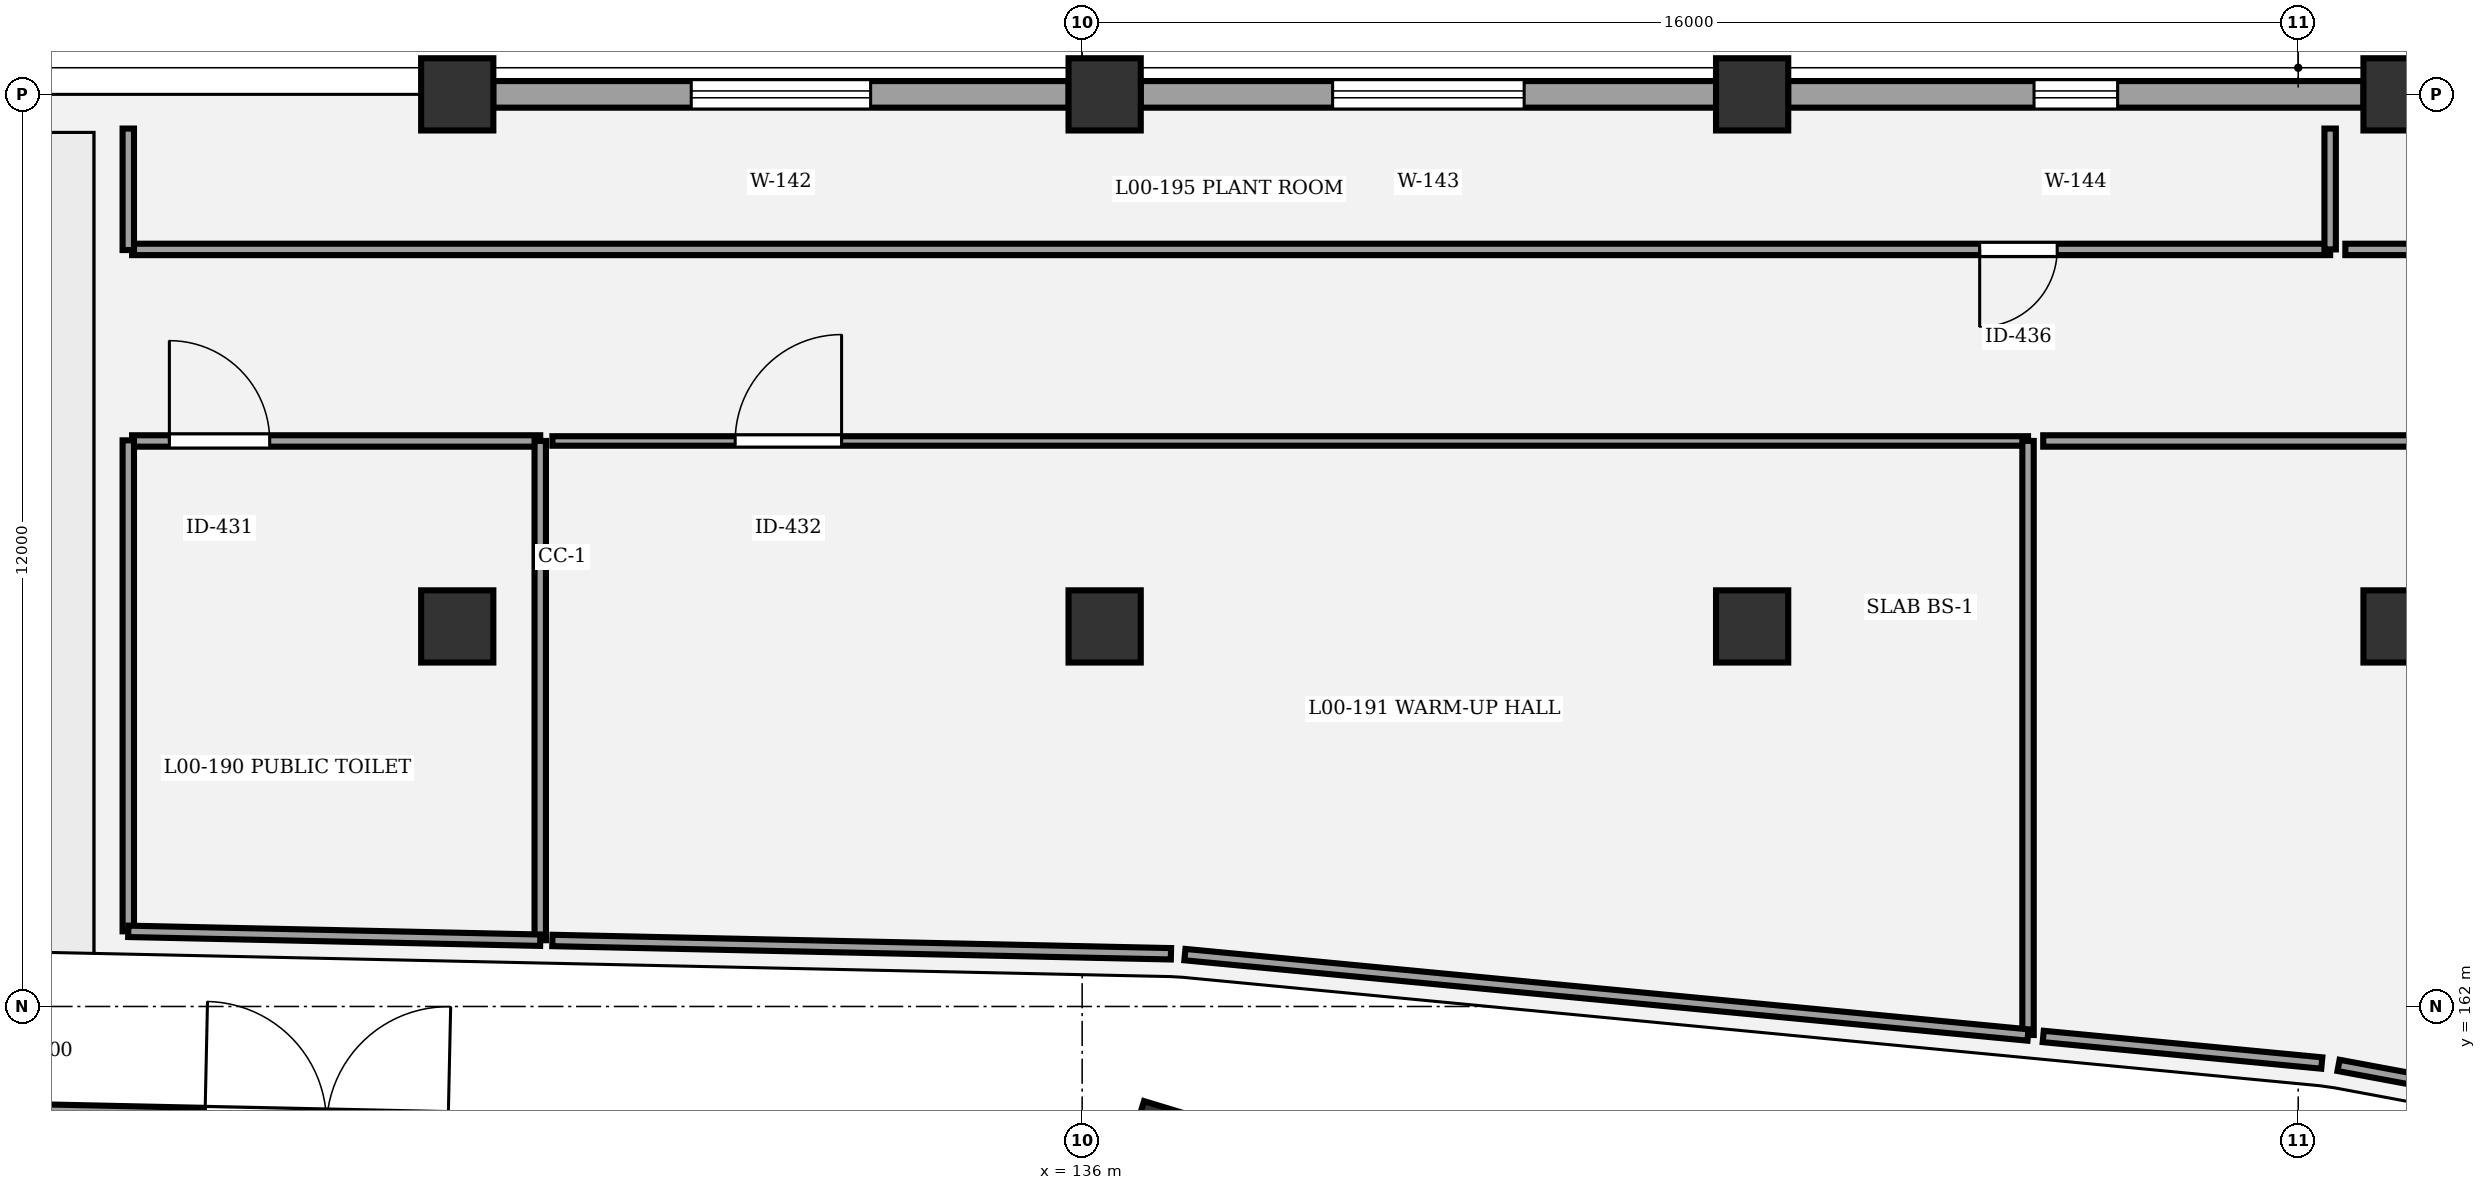
"""IFC4 building model, lengths in metres.
Left out: names, types, materials, properties, quantities, classifications, styles, units other than length and angle.
Written with IfcOpenShell. Run it as: python <this file> out.ifc"""

import sys

from ifc_helpers import new_model, si_unit, direction, frame, frame_2d, origin, origin_2d, place, context, subcontext, project, spatial, rectangle, circle, extrude, element, fill, save


model = new_model("IFC4")
c1 = context("Model", 3, precision=1e-05, world=origin(), true_north=direction((0.0, 1.0)))
c2 = subcontext(c1, "Body", "Model", "MODEL_VIEW")
j1 = project(units=[si_unit("LENGTHUNIT", "METRE"), si_unit("PLANEANGLEUNIT", "RADIAN")], contexts=[c1])
p1 = place(None, origin())
s1 = spatial("IfcSite", under=j1, at=p1, CompositionType="ELEMENT")
p2 = place(p1, origin())
s2 = spatial("IfcBuilding", under=s1, at=p2, CompositionType="ELEMENT")
p3 = place(p2, origin())
s3 = spatial("IfcBuildingStorey", under=s2, at=p3, CompositionType="ELEMENT", Elevation=0.0)
p4 = place(p3, frame((137.115, 160.194, 0.0), z_axis=(0.0, 0.0, 1.0), x_axis=(0.289198876314, 0.957269037387, 0.0)))
e1 = element("IfcColumn", 1, at=p4, inside=s3, PredefinedType="COLUMN", context=c2, shape_type="SweptSolid", body=[
    extrude(rectangle(XDim=0.9, YDim=0.9, at=origin_2d()), origin(), (0.0, 0.0, 1.0), 5.4),
])
for number, where, z_axis, x_axis in (
    (2, (127.778, 167.0, 0.0), (0.0, 0.0, 1.0), (1.0, 0.0, 0.0)),
    (3, (127.778, 174.0, 0.0), (0.0, 0.0, 1.0), (1.0, 0.0, 0.0)),
    (4, (136.296, 167.0, 0.0), (0.0, 0.0, 1.0), (1.0, 0.0, 0.0)),
    (5, (136.296, 174.0, 0.0), (0.0, 0.0, 1.0), (1.0, 0.0, 0.0)),
    (6, (144.815, 167.0, 0.0), (0.0, 0.0, 1.0), (1.0, 0.0, 0.0)),
    (7, (144.815, 174.0, 0.0), (0.0, 0.0, 1.0), (1.0, 0.0, 0.0)),
    (8, (153.333, 167.0, 0.0), (0.0, 0.0, 1.0), (1.0, 0.0, 0.0)),
    (9, (153.333, 174.0, 0.0), (0.0, 0.0, 1.0), (1.0, 0.0, 0.0)),
):
    element("IfcColumn", number, at=place(p3, frame(where, z_axis=z_axis, x_axis=x_axis)), inside=s3, PredefinedType="COLUMN", context=c2, shape_type="SweptSolid", body=[
        extrude(circle(Radius=0.475, at=origin_2d()), origin(), (0.0, 0.0, 1.0), 5.4),
    ])
p5 = place(p3, frame((115.448, 160.66, 0.0), z_axis=(0.0, 0.0, 1.0), x_axis=(0.999768115817, -0.021534033422, 0.0)))
e10 = element("IfcWall", 10, at=p5, inside=s3, PredefinedType="STANDARD", context=c2, shape_type="SweptSolid", body=[
    extrude(rectangle(XDim=21.224, YDim=0.4, at=frame_2d((10.612, 0.0))), origin(), (0.0, 0.0, 1.0), 4.25),
])
p6 = place(p5, frame((9.012, 0.0, 0.0)))
e11 = element("IfcOpeningElement", 11, at=p6, cuts=e10, PredefinedType="OPENING", context=c2, shape_type="SweptSolid", body=[
    extrude(rectangle(XDim=3.2, YDim=3.1, at=frame_2d((1.6, 1.55))), frame((0.0, 0.21, 0.0), z_axis=(0.0, -1.0, 0.0), x_axis=(1.0, 0.0, 0.0)), (0.0, 0.0, 1.0), 0.42),
])
p7 = place(p3, frame((128.251, 174.0, 0.0), z_axis=(0.0, 0.0, 1.0), x_axis=(1.0, 0.0, 0.0)))
e12 = element("IfcWall", 12, at=p7, inside=s3, PredefinedType="STANDARD", context=c2, shape_type="SweptSolid", body=[
    extrude(rectangle(XDim=7.572, YDim=0.35, at=frame_2d((3.786, 0.0))), origin(), (0.0, 0.0, 1.0), 4.16),
])
p8 = place(p7, frame((2.606, 0.0, 0.9)))
e13 = element("IfcOpeningElement", 13, at=p8, cuts=e12, PredefinedType="OPENING", context=c2, shape_type="SweptSolid", body=[
    extrude(rectangle(XDim=2.36, YDim=1.55, at=frame_2d((1.18, 0.775))), frame((0.0, 0.185, 0.0), z_axis=(0.0, -1.0, 0.0), x_axis=(1.0, 0.0, 0.0)), (0.0, 0.0, 1.0), 0.37),
])
p9 = place(p3, frame((136.769, 174.0, 0.0), z_axis=(0.0, 0.0, 1.0), x_axis=(1.0, 0.0, 0.0)))
e14 = element("IfcWall", 14, at=p9, inside=s3, PredefinedType="STANDARD", context=c2, shape_type="SweptSolid", body=[
    extrude(rectangle(XDim=7.573, YDim=0.35, at=frame_2d((3.787, 0.0))), origin(), (0.0, 0.0, 1.0), 4.16),
])
p10 = place(p9, frame((2.527, 0.0, 0.9)))
e15 = element("IfcOpeningElement", 15, at=p10, cuts=e14, PredefinedType="OPENING", context=c2, shape_type="SweptSolid", body=[
    extrude(rectangle(XDim=2.52, YDim=1.55, at=frame_2d((1.26, 0.775))), frame((0.0, 0.185, 0.0), z_axis=(0.0, -1.0, 0.0), x_axis=(1.0, 0.0, 0.0)), (0.0, 0.0, 1.0), 0.37),
])
p11 = place(p3, frame((145.288, 174.0, 0.0), z_axis=(0.0, 0.0, 1.0), x_axis=(1.0, 0.0, 0.0)))
e16 = element("IfcWall", 16, at=p11, inside=s3, PredefinedType="STANDARD", context=c2, shape_type="SweptSolid", body=[
    extrude(rectangle(XDim=7.572, YDim=0.35, at=frame_2d((3.786, 0.0))), origin(), (0.0, 0.0, 1.0), 4.16),
])
p12 = place(p11, frame((3.236, 0.0, 0.9)))
e17 = element("IfcOpeningElement", 17, at=p12, cuts=e16, PredefinedType="OPENING", context=c2, shape_type="SweptSolid", body=[
    extrude(rectangle(XDim=1.1, YDim=1.75, at=frame_2d((0.55, 0.875))), frame((0.0, 0.185, 0.0), z_axis=(0.0, -1.0, 0.0), x_axis=(1.0, 0.0, 0.0)), (0.0, 0.0, 1.0), 0.37),
])
p13 = place(p3, frame((123.5, 169.44, 0.0), z_axis=(0.0, 0.0, 1.0), x_axis=(1.0, 0.0, 0.0)))
e18 = element("IfcWall", 18, at=p13, inside=s3, PredefinedType="PARTITIONING", context=c2, shape_type="SweptSolid", body=[
    extrude(rectangle(XDim=5.37, YDim=0.15, at=frame_2d((2.685, 0.0))), origin(), (0.0, 0.0, 1.0), 4.15),
])
p14 = place(p13, frame((0.49, 0.0, 0.0)))
e19 = element("IfcOpeningElement", 19, at=p14, cuts=e18, PredefinedType="OPENING", context=c2, shape_type="SweptSolid", body=[
    extrude(rectangle(XDim=1.32, YDim=2.3, at=frame_2d((0.66, 1.15))), frame((0.0, 0.085, 0.0), z_axis=(0.0, -1.0, 0.0), x_axis=(1.0, 0.0, 0.0)), (0.0, 0.0, 1.0), 0.17),
])
p15 = place(p3, frame((129.03, 169.44, 0.0), z_axis=(0.0, 0.0, 1.0), x_axis=(1.0, 0.0, 0.0)))
e20 = element("IfcWall", 20, at=p15, inside=s3, PredefinedType="PARTITIONING", context=c2, shape_type="SweptSolid", body=[
    extrude(rectangle(XDim=19.415, YDim=0.125, at=frame_2d((9.708, 0.0))), origin(), (0.0, 0.0, 1.0), 4.15),
])
p16 = place(p15, frame((2.405, 0.0, 0.0)))
e21 = element("IfcOpeningElement", 21, at=p16, cuts=e20, PredefinedType="OPENING", context=c2, shape_type="SweptSolid", body=[
    extrude(rectangle(XDim=1.4, YDim=2.3, at=frame_2d((0.7, 1.15))), frame((0.0, 0.073, 0.0), z_axis=(0.0, -1.0, 0.0), x_axis=(1.0, 0.0, 0.0)), (0.0, 0.0, 1.0), 0.145),
])
p17 = place(p3, frame((148.645, 169.44, 0.0), z_axis=(0.0, 0.0, 1.0), x_axis=(1.0, 0.0, 0.0)))
e22 = element("IfcWall", 22, at=p17, inside=s3, PredefinedType="PARTITIONING", context=c2, shape_type="SweptSolid", body=[
    extrude(rectangle(XDim=24.995, YDim=0.15, at=frame_2d((12.498, 0.0))), origin(), (0.0, 0.0, 1.0), 4.15),
])
p18 = place(p17, frame((8.529, 0.0, 0.0)))
e23 = element("IfcOpeningElement", 23, at=p18, cuts=e22, PredefinedType="OPENING", context=c2, shape_type="SweptSolid", body=[
    extrude(rectangle(XDim=0.9, YDim=2.1, at=frame_2d((0.45, 1.05))), frame((0.0, 0.085, 0.0), z_axis=(0.0, -1.0, 0.0), x_axis=(1.0, 0.0, 0.0)), (0.0, 0.0, 1.0), 0.17),
])
p19 = place(p3, frame((152.42, 171.96, 0.0), z_axis=(0.0, 0.0, 1.0), x_axis=(-1.0, 0.0, 0.0)))
e24 = element("IfcWall", 24, at=p19, inside=s3, PredefinedType="PARTITIONING", context=c2, shape_type="SweptSolid", body=[
    extrude(rectangle(XDim=28.92, YDim=0.15, at=frame_2d((14.46, 0.0))), origin(), (0.0, 0.0, 1.0), 4.15),
])
p20 = place(p19, frame((3.591, 0.0, 0.0)))
e25 = element("IfcOpeningElement", 25, at=p20, cuts=e24, PredefinedType="OPENING", context=c2, shape_type="SweptSolid", body=[
    extrude(rectangle(XDim=1.02, YDim=2.1, at=frame_2d((0.51, 1.05))), frame((0.0, 0.085, 0.0), z_axis=(0.0, -1.0, 0.0), x_axis=(1.0, 0.0, 0.0)), (0.0, 0.0, 1.0), 0.17),
])
p21 = place(p3, frame((176.1, 171.96, 0.0), z_axis=(0.0, 0.0, 1.0), x_axis=(-1.0, 0.0, 0.0)))
e26 = element("IfcWall", 26, at=p21, inside=s3, PredefinedType="PARTITIONING", context=c2, shape_type="SweptSolid", body=[
    extrude(rectangle(XDim=23.48, YDim=0.15, at=frame_2d((11.74, 0.0))), origin(), (0.0, 0.0, 1.0), 4.15),
])
p22 = place(p21, frame((17.744, 0.0, 0.0)))
e27 = element("IfcOpeningElement", 27, at=p22, cuts=e26, PredefinedType="OPENING", context=c2, shape_type="SweptSolid", body=[
    extrude(rectangle(XDim=1.06, YDim=2.1, at=frame_2d((0.53, 1.05))), frame((0.0, 0.085, 0.0), z_axis=(0.0, -1.0, 0.0), x_axis=(1.0, 0.0, 0.0)), (0.0, 0.0, 1.0), 0.17),
])
p23 = place(p3, frame((123.45, 162.989, 0.0), z_axis=(0.0, 0.0, 1.0), x_axis=(0.0, 1.0, 0.0)))
e28 = element("IfcWall", 28, at=p23, inside=s3, PredefinedType="PARTITIONING", context=c2, shape_type="SweptSolid", body=[
    extrude(rectangle(XDim=6.46, YDim=0.15, at=frame_2d((3.23, 0.0))), origin(), (0.0, 0.0, 1.0), 4.15),
])
p24 = place(p3, frame((128.87, 169.44, 0.0), z_axis=(0.0, 0.0, 1.0), x_axis=(0.0, -1.0, 0.0)))
e29 = element("IfcWall", 29, at=p24, inside=s3, PredefinedType="PARTITIONING", context=c2, shape_type="SweptSolid", body=[
    extrude(rectangle(XDim=6.568, YDim=0.15, at=frame_2d((3.284, 0.0))), origin(), (0.0, 0.0, 1.0), 4.15),
])
p25 = place(p3, frame((128.87, 162.872, 0.0), z_axis=(0.0, 0.0, 1.0), x_axis=(-0.99976829801, 0.021525573012, 0.0)))
e30 = element("IfcWall", 30, at=p25, inside=s3, PredefinedType="PARTITIONING", context=c2, shape_type="SweptSolid", body=[
    extrude(rectangle(XDim=5.421, YDim=0.15, at=frame_2d((2.711, 0.0))), origin(), (0.0, 0.0, 1.0), 4.15),
])
p26 = place(p3, frame((137.168, 162.693, 0.0), z_axis=(0.0, 0.0, 1.0), x_axis=(-0.999768118076, 0.021533928567, 0.0)))
e31 = element("IfcWall", 31, at=p26, inside=s3, PredefinedType="PARTITIONING", context=c2, shape_type="SweptSolid", body=[
    extrude(rectangle(XDim=8.14, YDim=0.15, at=frame_2d((4.07, 0.0))), origin(), (0.0, 0.0, 1.0), 4.15),
])
p27 = place(p3, frame((148.445, 169.44, 0.0), z_axis=(0.0, 0.0, 1.0), x_axis=(0.0, -1.0, 0.0)))
e32 = element("IfcWall", 32, at=p27, inside=s3, PredefinedType="PARTITIONING", context=c2, shape_type="SweptSolid", body=[
    extrude(rectangle(XDim=7.815, YDim=0.15, at=frame_2d((3.908, 0.0))), origin(), (0.0, 0.0, 1.0), 4.15),
])
p28 = place(p3, frame((148.445, 161.625, 0.0), z_axis=(0.0, 0.0, 1.0), x_axis=(-0.995483944756, 0.094930057059, 0.0)))
e33 = element("IfcWall", 33, at=p28, inside=s3, PredefinedType="PARTITIONING", context=c2, shape_type="SweptSolid", body=[
    extrude(rectangle(XDim=11.144, YDim=0.15, at=frame_2d((5.572, 0.0))), origin(), (0.0, 0.0, 1.0), 4.15),
])
p29 = place(p3, frame((165.259, 158.854, 0.0), z_axis=(0.0, 0.0, 1.0), x_axis=(-0.983094545276, 0.183098648406, 0.0)))
e34 = element("IfcWall", 34, at=p29, inside=s3, PredefinedType="PARTITIONING", context=c2, shape_type="SweptSolid", body=[
    extrude(rectangle(XDim=12.947, YDim=0.15, at=frame_2d((6.474, 0.0))), origin(), (0.0, 0.0, 1.0), 4.15),
])
p30 = place(p3, frame((152.31, 161.256, 0.0), z_axis=(0.0, 0.0, 1.0), x_axis=(-0.995481155674, 0.094959300221, 0.0)))
e35 = element("IfcWall", 35, at=p30, inside=s3, PredefinedType="PARTITIONING", context=c2, shape_type="SweptSolid", body=[
    extrude(rectangle(XDim=3.682, YDim=0.15, at=frame_2d((1.841, 0.0))), origin(), (0.0, 0.0, 1.0), 4.15),
])
p31 = place(p3, frame((152.42, 173.55, 0.0), z_axis=(0.0, 0.0, 1.0), x_axis=(0.0, -1.0, 0.0)))
e36 = element("IfcWall", 36, at=p31, inside=s3, PredefinedType="PARTITIONING", context=c2, shape_type="SweptSolid", body=[
    extrude(rectangle(XDim=1.59, YDim=0.15, at=frame_2d((0.795, 0.0))), origin(), (0.0, 0.0, 1.0), 4.15),
])
p32 = place(p3, frame((123.45, 171.952, 0.0), z_axis=(0.0, 0.0, 1.0), x_axis=(0.0, 1.0, 0.0)))
e37 = element("IfcWall", 37, at=p32, inside=s3, PredefinedType="PARTITIONING", context=c2, shape_type="SweptSolid", body=[
    extrude(rectangle(XDim=1.598, YDim=0.15, at=frame_2d((0.799, 0.0))), origin(), (0.0, 0.0, 1.0), 4.15),
])
p33 = place(p8, origin())
e38 = element("IfcWindow", 38, at=p33, inside=s3, PartitioningType="SINGLE_PANEL", PredefinedType="WINDOW", context=c2, shape_type="SweptSolid", body=[
    extrude(rectangle(XDim=2.36, YDim=1.55, at=frame_2d((1.18, 0.775))), frame((0.0, 0.03, 0.0), z_axis=(0.0, -1.0, 0.0), x_axis=(1.0, 0.0, 0.0)), (0.0, 0.0, 1.0), 0.06),
])
fill(e13, e38)
p34 = place(p10, origin())
e39 = element("IfcWindow", 39, at=p34, inside=s3, PartitioningType="SINGLE_PANEL", PredefinedType="WINDOW", context=c2, shape_type="SweptSolid", body=[
    extrude(rectangle(XDim=2.52, YDim=1.55, at=frame_2d((1.26, 0.775))), frame((0.0, 0.03, 0.0), z_axis=(0.0, -1.0, 0.0), x_axis=(1.0, 0.0, 0.0)), (0.0, 0.0, 1.0), 0.06),
])
fill(e15, e39)
p35 = place(p12, origin())
e40 = element("IfcWindow", 40, at=p35, inside=s3, PartitioningType="SINGLE_PANEL", PredefinedType="WINDOW", context=c2, shape_type="SweptSolid", body=[
    extrude(rectangle(XDim=1.1, YDim=1.75, at=frame_2d((0.55, 0.875))), frame((0.0, 0.03, 0.0), z_axis=(0.0, -1.0, 0.0), x_axis=(1.0, 0.0, 0.0)), (0.0, 0.0, 1.0), 0.06),
])
fill(e17, e40)
p36 = place(p14, origin())
e41 = element("IfcDoor", 41, at=p36, inside=s3, OperationType="SINGLE_SWING_LEFT", PredefinedType="DOOR", context=c2, shape_type="SweptSolid", body=[
    extrude(rectangle(XDim=1.32, YDim=2.3, at=frame_2d((0.66, 1.15))), frame((0.0, 0.025, 0.0), z_axis=(0.0, -1.0, 0.0), x_axis=(1.0, 0.0, 0.0)), (0.0, 0.0, 1.0), 0.05),
])
fill(e19, e41)
p37 = place(p16, origin())
e42 = element("IfcDoor", 42, at=p37, inside=s3, OperationType="SINGLE_SWING_RIGHT", PredefinedType="DOOR", context=c2, shape_type="SweptSolid", body=[
    extrude(rectangle(XDim=1.4, YDim=2.3, at=frame_2d((0.7, 1.15))), frame((0.0, 0.025, 0.0), z_axis=(0.0, -1.0, 0.0), x_axis=(1.0, 0.0, 0.0)), (0.0, 0.0, 1.0), 0.05),
])
fill(e21, e42)
p38 = place(p20, origin())
e43 = element("IfcDoor", 43, at=p38, inside=s3, OperationType="SINGLE_SWING_RIGHT", PredefinedType="DOOR", context=c2, shape_type="SweptSolid", body=[
    extrude(rectangle(XDim=1.02, YDim=2.1, at=frame_2d((0.51, 1.05))), frame((0.0, 0.025, 0.0), z_axis=(0.0, -1.0, 0.0), x_axis=(1.0, 0.0, 0.0)), (0.0, 0.0, 1.0), 0.05),
])
fill(e25, e43)
save(model, sys.argv[1])
